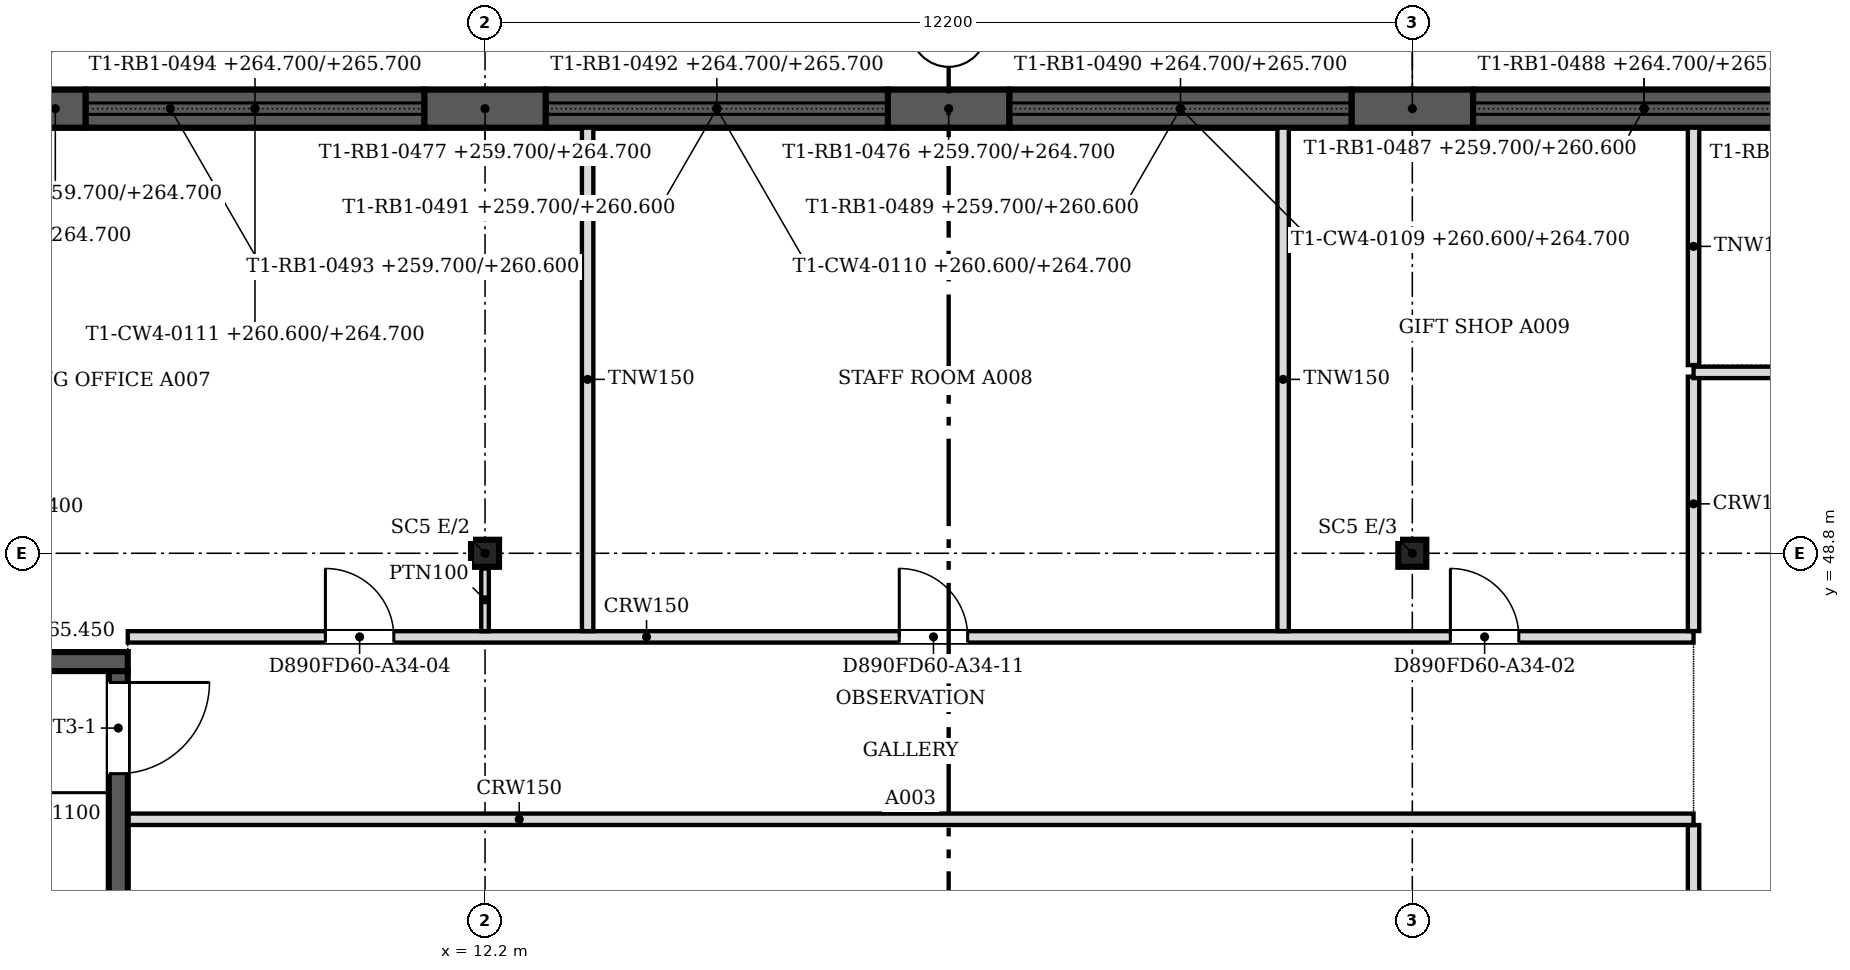
"""IFC4 building model, lengths in metres.
Left out: names, types, materials, properties, quantities, classifications, styles, units other than length and angle.
Written with IfcOpenShell. Run it as: python <this file> out.ifc"""

import sys

from ifc_helpers import new_model, si_unit, direction, frame, frame_2d, origin, origin_2d, place, context, subcontext, project, spatial, polyline, rectangle, i_section, outline, extrude, faceted_brep, source, transform, mapped, element, fill, save


model = new_model("IFC4")
c1 = context("Model", 3, precision=1e-05, world=origin(), true_north=direction((0.0, 1.0)))
c2 = subcontext(c1, "Body", "Model", "MODEL_VIEW")
j1 = project(units=[si_unit("LENGTHUNIT", "METRE"), si_unit("PLANEANGLEUNIT", "RADIAN")], contexts=[c1])
p1 = place(None, origin())
s1 = spatial("IfcSite", under=j1, at=p1, CompositionType="ELEMENT")
p2 = place(p1, origin())
s2 = spatial("IfcBuilding", under=s1, at=p2, CompositionType="ELEMENT")
p3 = place(p2, frame((0.0, 0.0, 259.7)))
s3 = spatial("IfcBuildingStorey", under=s2, at=p3, CompositionType="ELEMENT", Elevation=259.7)
for number, where, z_axis, x_axis in (
    (1, (12.2, 48.8, 0.0), (0.0, 0.0, 1.0), (1.0, 0.0, 0.0)),
    (2, (24.4, 48.8, 0.0), (0.0, 0.0, 1.0), (1.0, 0.0, 0.0)),
):
    element("IfcColumn", number, at=place(p3, frame(where, z_axis=z_axis, x_axis=x_axis)), inside=s3, PredefinedType="COLUMN", context=c2, shape_type="SweptSolid", body=[
        extrude(i_section(OverallWidth=0.369, OverallDepth=0.356, WebThickness=0.011, FlangeThickness=0.018, at=origin_2d()), origin(), (0.0, 0.0, 1.0), 5.7),
    ])
m1 = source(origin(), c2, "Body", "Brep", [
    faceted_brep([(0.0, -0.25, 0.0), (1.6, -0.25, 0.0), (1.6, -0.25, 5.0), (0.0, -0.25, 5.0), (0.0, 0.25, 5.0), (1.6, 0.25, 5.0), (1.6, 0.25, 0.0), (0.0, 0.25, 0.0)], [[[0, 1, 2, 3]], [[4, 5, 6, 7]], [[7, 6, 1, 0]], [[5, 4, 3, 2]], [[4, 7, 0, 3]], [[1, 6, 5, 2]]]),
])
p4 = place(p3, frame((25.2, 54.65, 0.0), z_axis=(0.0, 0.0, 1.0), x_axis=(-1.0, 0.0, 0.0)))
e3 = element("IfcWall", 3, at=p4, inside=s3, PredefinedType="SOLIDWALL", context=c2, shape_type="MappedRepresentation", body=[
    mapped(m1, transform((0.0, 0.0, 0.0), scale=1.0)),
])
m2 = source(origin(), c2, "Body", "SweptSolid", [
    extrude(outline(polyline([(0.0, 0.0), (1.6, 0.0), (1.6, 5.0), (0.0, 5.0), (0.0, 0.0)])), frame((0.0, 0.25, 0.0), z_axis=(0.0, -1.0, 0.0), x_axis=(1.0, 0.0, 0.0)), (0.0, 0.0, 1.0), 0.5),
])
for number, where, z_axis, x_axis in (
    (4, (19.1, 54.65, 0.0), (0.0, 0.0, 1.0), (-1.0, 0.0, 0.0)),
    (5, (13.0, 54.65, 0.0), (0.0, 0.0, 1.0), (-1.0, 0.0, 0.0)),
):
    element("IfcWall", number, at=place(p3, frame(where, z_axis=z_axis, x_axis=x_axis)), inside=s3, PredefinedType="SOLIDWALL", context=c2, shape_type="MappedRepresentation", body=[
        mapped(m2, transform((0.0, 0.0, 0.0), scale=1.0)),
    ])
m3 = source(origin(), c2, "Body", "Brep", [
    faceted_brep([(0.0, -0.25, 0.0), (0.8, -0.25, 0.0), (0.8, -0.25, 5.0), (0.0, -0.25, 5.0), (0.0, 0.25, 5.0), (0.753, 0.25, 5.0), (0.753, 0.25, 0.0), (0.0, 0.25, 0.0), (0.8, -0.0, 0.0), (0.8, -0.0, 5.0)], [[[0, 1, 2, 3]], [[4, 5, 6, 7]], [[7, 6, 8, 1, 0]], [[9, 2, 1, 8]], [[5, 4, 3, 2, 9]], [[4, 7, 0, 3]], [[8, 6, 5, 9]]]),
])
p5 = place(p3, frame((6.947, 54.65, 0.0), z_axis=(0.0, 0.0, 1.0), x_axis=(-1.0, 0.0, 0.0)))
e6 = element("IfcWall", 6, at=p5, inside=s3, PredefinedType="SOLIDWALL", context=c2, shape_type="MappedRepresentation", body=[
    mapped(m3, transform((0.0, 0.0, 0.0), scale=1.0)),
])
m4 = source(origin(), c2, "Body", "SweptSolid", [
    extrude(outline(polyline([(0.0, 0.0), (4.5, 0.0), (4.5, 0.9), (0.0, 0.9), (0.0, 0.0)])), frame((0.0, 0.25, 0.0), z_axis=(0.0, -1.0, 0.0), x_axis=(1.0, 0.0, 0.0)), (0.0, 0.0, 1.0), 0.5),
])
p6 = place(p3, frame((29.7, 54.65, 0.0), z_axis=(0.0, 0.0, 1.0), x_axis=(-1.0, 0.0, 0.0)))
e7 = element("IfcWall", 7, at=p6, inside=s3, PredefinedType="SOLIDWALL", context=c2, shape_type="MappedRepresentation", body=[
    mapped(m4, transform((0.0, 0.0, 0.0), scale=1.0)),
])
m5 = source(origin(), c2, "Body", "SweptSolid", [
    extrude(outline(polyline([(0.0, 0.0), (6.1, 0.0), (6.1, 1.0), (0.0, 1.0), (0.0, 0.0)])), frame((0.0, 0.25, 0.0), z_axis=(0.0, -1.0, 0.0), x_axis=(1.0, 0.0, 0.0)), (0.0, 0.0, 1.0), 0.5),
])
p7 = place(p3, frame((30.5, 54.65, 5.0), z_axis=(0.0, 0.0, 1.0), x_axis=(-1.0, 0.0, 0.0)))
e8 = element("IfcWall", 8, at=p7, inside=s3, PredefinedType="SOLIDWALL", context=c2, shape_type="MappedRepresentation", body=[
    mapped(m5, transform((0.0, 0.0, 0.0), scale=1.0)),
])
p8 = place(p3, frame((23.6, 54.65, 0.0), z_axis=(0.0, 0.0, 1.0), x_axis=(-1.0, 0.0, 0.0)))
e9 = element("IfcWall", 9, at=p8, inside=s3, PredefinedType="SOLIDWALL", context=c2, shape_type="MappedRepresentation", body=[
    mapped(m4, transform((0.0, 0.0, 0.0), scale=1.0)),
])
m6 = source(origin(), c2, "Body", "Brep", [
    faceted_brep([(0.0, -0.25, 0.0), (6.1, -0.25, 0.0), (6.1, -0.25, 1.0), (0.0, -0.25, 1.0), (0.0, 0.25, 1.0), (6.1, 0.25, 1.0), (6.1, 0.25, 0.0), (0.0, 0.25, 0.0)], [[[0, 1, 2, 3]], [[4, 5, 6, 7]], [[7, 6, 1, 0]], [[5, 4, 3, 2]], [[4, 7, 0, 3]], [[1, 6, 5, 2]]]),
])
p9 = place(p3, frame((24.4, 54.65, 5.0), z_axis=(0.0, 0.0, 1.0), x_axis=(-1.0, 0.0, 0.0)))
e10 = element("IfcWall", 10, at=p9, inside=s3, PredefinedType="SOLIDWALL", context=c2, shape_type="MappedRepresentation", body=[
    mapped(m6, transform((0.0, 0.0, 0.0), scale=1.0)),
])
p10 = place(p3, frame((17.5, 54.65, 0.0), z_axis=(0.0, 0.0, 1.0), x_axis=(-1.0, 0.0, 0.0)))
e11 = element("IfcWall", 11, at=p10, inside=s3, PredefinedType="SOLIDWALL", context=c2, shape_type="MappedRepresentation", body=[
    mapped(m4, transform((0.0, 0.0, 0.0), scale=1.0)),
])
p11 = place(p3, frame((18.3, 54.65, 5.0), z_axis=(0.0, 0.0, 1.0), x_axis=(-1.0, 0.0, 0.0)))
e12 = element("IfcWall", 12, at=p11, inside=s3, PredefinedType="SOLIDWALL", context=c2, shape_type="MappedRepresentation", body=[
    mapped(m5, transform((0.0, 0.0, 0.0), scale=1.0)),
])
m7 = source(origin(), c2, "Body", "SweptSolid", [
    extrude(outline(polyline([(0.0, 0.0), (4.453, 0.0), (4.453, 0.9), (0.0, 0.9), (0.0, 0.0)])), frame((0.0, 0.25, 0.0), z_axis=(0.0, -1.0, 0.0), x_axis=(1.0, 0.0, 0.0)), (0.0, 0.0, 1.0), 0.5),
])
p12 = place(p3, frame((11.4, 54.65, 0.0), z_axis=(0.0, 0.0, 1.0), x_axis=(-1.0, 0.0, 0.0)))
e13 = element("IfcWall", 13, at=p12, inside=s3, PredefinedType="SOLIDWALL", context=c2, shape_type="MappedRepresentation", body=[
    mapped(m7, transform((0.0, 0.0, 0.0), scale=1.0)),
])
m8 = source(origin(), c2, "Body", "Brep", [
    faceted_brep([(0.0, -0.25, 0.0), (6.053, -0.25, 0.0), (6.053, -0.25, 1.0), (0.0, -0.25, 1.0), (0.0, 0.25, 1.0), (6.007, 0.25, 1.0), (6.007, 0.25, 0.0), (0.0, 0.25, 0.0), (6.053, 0.0, 0.0), (6.053, 0.0, 1.0)], [[[0, 1, 2, 3]], [[4, 5, 6, 7]], [[7, 6, 8, 1, 0]], [[9, 2, 1, 8]], [[5, 4, 3, 2, 9]], [[4, 7, 0, 3]], [[8, 6, 5, 9]]]),
])
p13 = place(p3, frame((12.2, 54.65, 5.0), z_axis=(0.0, 0.0, 1.0), x_axis=(-1.0, 0.0, 0.0)))
e14 = element("IfcWall", 14, at=p13, inside=s3, PredefinedType="SOLIDWALL", context=c2, shape_type="MappedRepresentation", body=[
    mapped(m8, transform((0.0, 0.0, 0.0), scale=1.0)),
])
p14 = place(p3, frame((3.6, 47.375, 0.0), z_axis=(0.0, 0.0, 1.0), x_axis=(1.0, 0.0, 0.0)))
e15 = element("IfcWall", 15, at=p14, inside=s3, PredefinedType="SOLIDWALL", context=c2, shape_type="SweptSolid", body=[
    extrude(rectangle(XDim=3.9, YDim=0.25, at=frame_2d((1.95, 0.0))), origin(), (0.0, 0.0, 1.0), 5.75),
])
p15 = place(p3, frame((7.375, 47.25, 0.0), z_axis=(0.0, 0.0, 1.0), x_axis=(0.0, -1.0, 0.0)))
e16 = element("IfcWall", 16, at=p15, inside=s3, PredefinedType="SOLIDWALL", context=c2, shape_type="SweptSolid", body=[
    extrude(rectangle(XDim=8.0, YDim=0.25, at=frame_2d((4.0, 0.0))), origin(), (0.0, 0.0, 1.0), 5.75),
])
m9 = source(origin(), c2, "Body", "SweptSolid", [
    extrude(rectangle(XDim=1.2, YDim=2.1, at=frame_2d((0.6, 1.05))), frame((0.0, 0.135, 0.0), z_axis=(0.0, -1.0, 0.0), x_axis=(1.0, 0.0, 0.0)), (0.0, 0.0, 1.0), 0.27),
])
p16 = place(p15, frame((0.15, 0.0, 0.0)))
e17 = element("IfcOpeningElement", 17, at=p16, cuts=e16, PredefinedType="OPENING", context=c2, shape_type="MappedRepresentation", body=[
    mapped(m9, transform((0.0, 0.0, 0.0), scale=1.0)),
])
p17 = place(p3, frame((28.1, 22.0, 0.0), z_axis=(0.0, 0.0, 1.0), x_axis=(0.0, 1.0, 0.0)))
e18 = element("IfcWall", 18, at=p17, inside=s3, PredefinedType="PARTITIONING", context=c2, shape_type="SweptSolid", body=[
    extrude(rectangle(XDim=23.224, YDim=0.15, at=frame_2d((11.612, 0.0))), origin(), (0.0, 0.0, 1.0), 5.167),
])
m10 = source(origin(), c2, "Body", "SweptSolid", [
    extrude(rectangle(XDim=1.8, YDim=2.1, at=frame_2d((0.9, 1.05))), frame((0.0, 0.085, 0.0), z_axis=(0.0, -1.0, 0.0), x_axis=(1.0, 0.0, 0.0)), (0.0, 0.0, 1.0), 0.17),
])
p18 = place(p17, frame((9.301, 0.0, 0.0)))
e19 = element("IfcOpeningElement", 19, at=p18, cuts=e18, PredefinedType="OPENING", context=c2, shape_type="MappedRepresentation", body=[
    mapped(m10, transform((0.0, 0.0, 0.0), scale=1.0)),
])
p19 = place(p17, frame((2.6, 0.0, 0.0)))
e20 = element("IfcOpeningElement", 20, at=p19, cuts=e18, PredefinedType="OPENING", context=c2, shape_type="MappedRepresentation", body=[
    mapped(m10, transform((0.0, 0.0, 0.0), scale=1.0)),
])
m11 = source(origin(), c2, "Body", "SweptSolid", [
    extrude(rectangle(XDim=1.5, YDim=2.1, at=frame_2d((0.75, 1.05))), frame((0.0, 0.085, 0.0), z_axis=(0.0, -1.0, 0.0), x_axis=(1.0, 0.0, 0.0)), (0.0, 0.0, 1.0), 0.17),
])
p20 = place(p17, frame((17.6, 0.0, 0.0)))
e21 = element("IfcOpeningElement", 21, at=p20, cuts=e18, PredefinedType="OPENING", context=c2, shape_type="MappedRepresentation", body=[
    mapped(m11, transform((0.0, 0.0, 0.0), scale=1.0)),
])
p21 = place(p3, frame((7.5, 45.3, 0.0), z_axis=(0.0, 0.0, 1.0), x_axis=(1.0, 0.0, 0.0)))
e22 = element("IfcWall", 22, at=p21, inside=s3, PredefinedType="PARTITIONING", context=c2, shape_type="SweptSolid", body=[
    extrude(rectangle(XDim=20.6, YDim=0.15, at=frame_2d((10.3, 0.0))), origin(), (0.0, 0.0, 1.0), 5.167),
])
p22 = place(p3, frame((7.5, 47.7, 0.0), z_axis=(0.0, 0.0, 1.0), x_axis=(1.0, 0.0, 0.0)))
e23 = element("IfcWall", 23, at=p22, inside=s3, PredefinedType="PARTITIONING", context=c2, shape_type="SweptSolid", body=[
    extrude(rectangle(XDim=20.6, YDim=0.15, at=frame_2d((10.3, 0.0))), origin(), (0.0, 0.0, 1.0), 5.167),
])
m12 = source(origin(), c2, "Body", "SweptSolid", [
    extrude(rectangle(XDim=0.9, YDim=2.1, at=frame_2d((0.45, 1.05))), frame((0.0, 0.085, 0.0), z_axis=(0.0, -1.0, 0.0), x_axis=(1.0, 0.0, 0.0)), (0.0, 0.0, 1.0), 0.17),
])
p23 = place(p22, frame((17.401, 0.0, 0.0)))
e24 = element("IfcOpeningElement", 24, at=p23, cuts=e23, PredefinedType="OPENING", context=c2, shape_type="MappedRepresentation", body=[
    mapped(m12, transform((0.0, 0.0, 0.0), scale=1.0)),
])
p24 = place(p22, frame((2.6, 0.0, 0.0)))
e25 = element("IfcOpeningElement", 25, at=p24, cuts=e23, PredefinedType="OPENING", context=c2, shape_type="MappedRepresentation", body=[
    mapped(m12, transform((0.0, 0.0, 0.0), scale=1.0)),
])
p25 = place(p22, frame((10.15, 0.0, 0.0)))
e26 = element("IfcOpeningElement", 26, at=p25, cuts=e23, PredefinedType="OPENING", context=c2, shape_type="MappedRepresentation", body=[
    mapped(m12, transform((0.0, 0.0, 0.0), scale=1.0)),
])
for number, where, z_axis, x_axis in (
    (27, (13.55, 47.776, 0.0), (0.0, 0.0, 1.0), (0.0, 1.0, 0.0)),
    (28, (22.7, 47.776, 0.0), (0.0, 0.0, 1.0), (0.0, 1.0, 0.0)),
):
    element("IfcWall", number, at=place(p3, frame(where, z_axis=z_axis, x_axis=x_axis)), inside=s3, PredefinedType="PARTITIONING", context=c2, shape_type="SweptSolid", body=[
        extrude(rectangle(XDim=6.624, YDim=0.15, at=frame_2d((3.312, 0.0))), origin(), (0.0, 0.0, 1.0), 5.167),
    ])
p26 = place(p3, frame((28.1, 47.776, 0.0), z_axis=(0.0, 0.0, 1.0), x_axis=(0.0, 1.0, 0.0)))
e29 = element("IfcWall", 29, at=p26, inside=s3, PredefinedType="PARTITIONING", context=c2, shape_type="SweptSolid", body=[
    extrude(rectangle(XDim=3.348, YDim=0.15, at=frame_2d((1.674, 0.0))), origin(), (0.0, 0.0, 1.0), 5.167),
])
p27 = place(p3, frame((12.2, 48.6, 0.0), z_axis=(0.0, 0.0, 1.0), x_axis=(0.0, -1.0, 0.0)))
e30 = element("IfcWall", 30, at=p27, inside=s3, PredefinedType="PARTITIONING", context=c2, shape_type="SweptSolid", body=[
    extrude(rectangle(XDim=0.825, YDim=0.1, at=frame_2d((0.413, 0.0))), origin(), (0.0, 0.0, 1.0), 5.167),
])
p28 = place(p3, frame((28.1, 51.18, 0.0), z_axis=(0.0, 0.0, 1.0), x_axis=(1.0, 0.0, 0.0)))
e31 = element("IfcWall", 31, at=p28, inside=s3, PredefinedType="PARTITIONING", context=c2, shape_type="SweptSolid", body=[
    extrude(rectangle(XDim=31.438, YDim=0.15, at=frame_2d((15.719, 0.0))), origin(), (0.0, 0.0, 1.0), 5.167),
])
p29 = place(p28, frame((17.851, 0.0, 0.0)))
e32 = element("IfcOpeningElement", 32, at=p29, cuts=e31, PredefinedType="OPENING", context=c2, shape_type="MappedRepresentation", body=[
    mapped(m12, transform((0.0, 0.0, 0.0), scale=1.0)),
])
p30 = place(p28, frame((2.6, 0.0, 0.0)))
e33 = element("IfcOpeningElement", 33, at=p30, cuts=e31, PredefinedType="OPENING", context=c2, shape_type="MappedRepresentation", body=[
    mapped(m12, transform((0.0, 0.0, 0.0), scale=1.0)),
])
p31 = place(p28, frame((10.2, 0.0, 0.0)))
e34 = element("IfcOpeningElement", 34, at=p31, cuts=e31, PredefinedType="OPENING", context=c2, shape_type="MappedRepresentation", body=[
    mapped(m12, transform((0.0, 0.0, 0.0), scale=1.0)),
])
p32 = place(p28, frame((25.95, 0.0, 0.0)))
e35 = element("IfcOpeningElement", 35, at=p32, cuts=e31, PredefinedType="OPENING", context=c2, shape_type="MappedRepresentation", body=[
    mapped(m12, transform((0.0, 0.0, 0.0), scale=1.0)),
])
p33 = place(p3, frame((28.1, 51.276, 0.0), z_axis=(0.0, 0.0, 1.0), x_axis=(0.0, 1.0, 0.0)))
e36 = element("IfcWall", 36, at=p33, inside=s3, PredefinedType="PARTITIONING", context=c2, shape_type="SweptSolid", body=[
    extrude(rectangle(XDim=3.124, YDim=0.15, at=frame_2d((1.562, 0.0))), origin(), (0.0, 0.0, 1.0), 5.167),
])
m13 = source(origin(), c2, "Body", "SweptSolid", [
    extrude(rectangle(XDim=1.2, YDim=2.1, at=frame_2d((0.6, 1.05))), frame((0.0, 0.025, 0.0), z_axis=(0.0, -1.0, 0.0), x_axis=(1.0, 0.0, 0.0)), (0.0, 0.0, 1.0), 0.05),
])
p34 = place(p16, origin())
e37 = element("IfcDoor", 37, at=p34, inside=s3, OperationType="SINGLE_SWING_LEFT", PredefinedType="DOOR", context=c2, shape_type="MappedRepresentation", body=[
    mapped(m13, transform((0.0, 0.0, 0.0), scale=1.0)),
])
fill(e17, e37)
m14 = source(origin(), c2, "Body", "SweptSolid", [
    extrude(rectangle(XDim=0.9, YDim=2.1, at=frame_2d((0.45, 1.05))), frame((0.0, 0.025, 0.0), z_axis=(0.0, -1.0, 0.0), x_axis=(1.0, 0.0, 0.0)), (0.0, 0.0, 1.0), 0.05),
])
p35 = place(p23, origin())
e38 = element("IfcDoor", 38, at=p35, inside=s3, OperationType="SINGLE_SWING_LEFT", PredefinedType="DOOR", context=c2, shape_type="MappedRepresentation", body=[
    mapped(m14, transform((0.0, 0.0, 0.0), scale=1.0)),
])
fill(e24, e38)
p36 = place(p24, origin())
e39 = element("IfcDoor", 39, at=p36, inside=s3, OperationType="SINGLE_SWING_LEFT", PredefinedType="DOOR", context=c2, shape_type="MappedRepresentation", body=[
    mapped(m14, transform((0.0, 0.0, 0.0), scale=1.0)),
])
fill(e25, e39)
p37 = place(p25, origin())
e40 = element("IfcDoor", 40, at=p37, inside=s3, OperationType="SINGLE_SWING_LEFT", PredefinedType="DOOR", context=c2, shape_type="MappedRepresentation", body=[
    mapped(m14, transform((0.0, 0.0, 0.0), scale=1.0)),
])
fill(e26, e40)
save(model, sys.argv[1])
